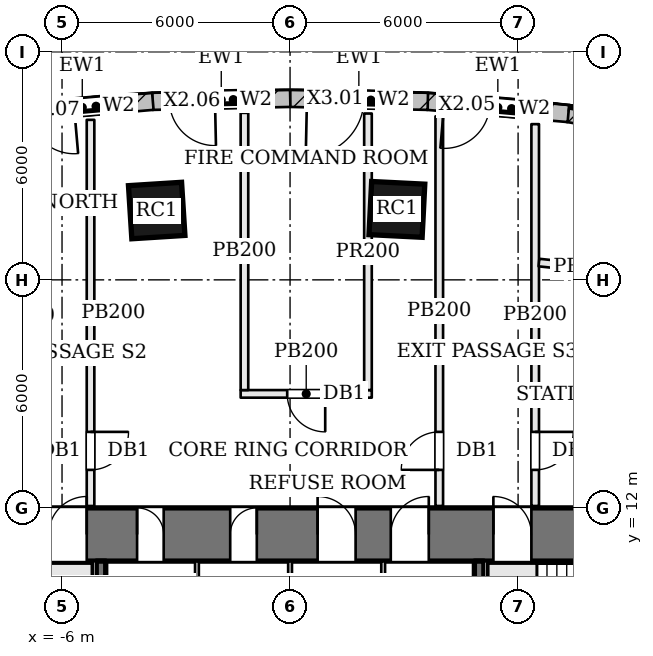
"""IFC4 building model, lengths in metres.
Left out: names, types, materials, properties, quantities, classifications, styles, units other than length and angle.
Written with IfcOpenShell. Run it as: python <this file> out.ifc"""

import sys

from ifc_helpers import new_model, si_unit, direction, frame, frame_2d, origin, origin_2d, place, context, subcontext, project, spatial, rectangle, extrude, element, fill, save


model = new_model("IFC4")
c1 = context("Model", 3, precision=1e-05, world=origin(), true_north=direction((0.0, 1.0)))
c2 = subcontext(c1, "Body", "Model", "MODEL_VIEW")
j1 = project(units=[si_unit("LENGTHUNIT", "METRE"), si_unit("PLANEANGLEUNIT", "RADIAN")], contexts=[c1])
p1 = place(None, origin())
s1 = spatial("IfcSite", under=j1, at=p1, CompositionType="ELEMENT")
p2 = place(p1, origin())
s2 = spatial("IfcBuilding", under=s1, at=p2, CompositionType="ELEMENT")
p3 = place(p2, origin())
s3 = spatial("IfcBuildingStorey", under=s2, at=p3, CompositionType="ELEMENT", Elevation=0.0)
p4 = place(p3, frame((-13.0, 11.3, 0.0), z_axis=(0.0, 0.0, 1.0), x_axis=(1.0, 0.0, 0.0)))
e1 = element("IfcWall", 1, at=p4, inside=s3, PredefinedType="SHEAR", context=c2, shape_type="SweptSolid", body=[
    extrude(rectangle(XDim=26.0, YDim=1.4, at=frame_2d((13.0, 0.0))), origin(), (0.0, 0.0, 1.0), 7.2),
])
p5 = place(p4, frame((8.975, 0.0, 0.0)))
e2 = element("IfcOpeningElement", 2, at=p5, cuts=e1, PredefinedType="OPENING", context=c2, shape_type="SweptSolid", body=[
    extrude(rectangle(XDim=0.7, YDim=2.1, at=frame_2d((0.35, 1.05))), frame((0.0, 0.71, 0.0), z_axis=(0.0, -1.0, 0.0), x_axis=(1.0, 0.0, 0.0)), (0.0, 0.0, 1.0), 1.42),
])
p6 = place(p4, frame((11.425, 0.0, 0.0)))
e3 = element("IfcOpeningElement", 3, at=p6, cuts=e1, PredefinedType="OPENING", context=c2, shape_type="SweptSolid", body=[
    extrude(rectangle(XDim=0.7, YDim=2.1, at=frame_2d((0.35, 1.05))), frame((0.0, 0.71, 0.0), z_axis=(0.0, -1.0, 0.0), x_axis=(1.0, 0.0, 0.0)), (0.0, 0.0, 1.0), 1.42),
])
p7 = place(p4, frame((13.725, 0.0, 0.0)))
e4 = element("IfcOpeningElement", 4, at=p7, cuts=e1, PredefinedType="OPENING", context=c2, shape_type="SweptSolid", body=[
    extrude(rectangle(XDim=1.0, YDim=2.1, at=frame_2d((0.5, 1.05))), frame((0.0, 0.71, 0.0), z_axis=(0.0, -1.0, 0.0), x_axis=(1.0, 0.0, 0.0)), (0.0, 0.0, 1.0), 1.42),
])
p8 = place(p4, frame((15.65, 0.0, 0.0)))
e5 = element("IfcOpeningElement", 5, at=p8, cuts=e1, PredefinedType="OPENING", context=c2, shape_type="SweptSolid", body=[
    extrude(rectangle(XDim=1.0, YDim=2.1, at=frame_2d((0.5, 1.05))), frame((0.0, 0.71, 0.0), z_axis=(0.0, -1.0, 0.0), x_axis=(1.0, 0.0, 0.0)), (0.0, 0.0, 1.0), 1.42),
])
p9 = place(p4, frame((6.65, 0.0, 0.0)))
e6 = element("IfcOpeningElement", 6, at=p9, cuts=e1, PredefinedType="OPENING", context=c2, shape_type="SweptSolid", body=[
    extrude(rectangle(XDim=1.0, YDim=2.1, at=frame_2d((0.5, 1.05))), frame((0.0, 0.71, 0.0), z_axis=(0.0, -1.0, 0.0), x_axis=(1.0, 0.0, 0.0)), (0.0, 0.0, 1.0), 1.42),
])
p10 = place(p4, frame((18.35, 0.0, 0.0)))
e7 = element("IfcOpeningElement", 7, at=p10, cuts=e1, PredefinedType="OPENING", context=c2, shape_type="SweptSolid", body=[
    extrude(rectangle(XDim=1.0, YDim=2.1, at=frame_2d((0.5, 1.05))), frame((0.0, 0.71, 0.0), z_axis=(0.0, -1.0, 0.0), x_axis=(1.0, 0.0, 0.0)), (0.0, 0.0, 1.0), 1.42),
])
for number, where, z_axis, x_axis in (
    (8, (2.811, 19.854, 0.0), (0.0, 0.0, 1.0), (-0.999, 0.05, 0.0)),
    (9, (-3.509, 19.824, 0.0), (0.0, 0.0, 1.0), (-0.998, -0.063, 0.0)),
):
    element("IfcColumn", number, at=place(p3, frame(where, z_axis=z_axis, x_axis=x_axis)), inside=s3, PredefinedType="COLUMN", context=c2, shape_type="SweptSolid", body=[
        extrude(rectangle(XDim=1.4, YDim=1.4, at=origin_2d()), origin(), (0.0, 0.0, 1.0), 7.2),
    ])
p11 = place(p3, frame((11.134, 21.706, 0.0), z_axis=(0.0, 0.0, 1.0), x_axis=(-0.984947461591, 0.172853978566, 0.0)))
e10 = element("IfcWall", 10, at=p11, inside=s3, PredefinedType="SOLIDWALL", context=c2, shape_type="SweptSolid", body=[
    extrude(rectangle(XDim=3.888, YDim=0.45, at=frame_2d((1.944, 0.0))), origin(), (0.0, 0.0, 1.0), 3.55),
])
p12 = place(p11, frame((0.744, 0.0, 0.0)))
e11 = element("IfcOpeningElement", 11, at=p12, cuts=e10, PredefinedType="OPENING", context=c2, shape_type="SweptSolid", body=[
    extrude(rectangle(XDim=2.4, YDim=3.2, at=frame_2d((1.2, 1.6))), frame((0.0, 0.235, 0.0), z_axis=(0.0, -1.0, 0.0), x_axis=(1.0, 0.0, 0.0)), (0.0, 0.0, 1.0), 0.47),
])
p13 = place(p3, frame((7.323, 22.376, 0.0), z_axis=(0.0, 0.0, 1.0), x_axis=(-0.996259982326, 0.086406293838, 0.0)))
e12 = element("IfcWall", 12, at=p13, inside=s3, PredefinedType="SOLIDWALL", context=c2, shape_type="SweptSolid", body=[
    extrude(rectangle(XDim=3.727, YDim=0.45, at=frame_2d((1.863, 0.0))), origin(), (0.0, 0.0, 1.0), 6.95),
])
p14 = place(p13, frame((0.45, 0.0, 0.9)))
e13 = element("IfcOpeningElement", 13, at=p14, cuts=e12, PredefinedType="OPENING", context=c2, shape_type="SweptSolid", body=[
    extrude(rectangle(XDim=2.1, YDim=5.0, at=frame_2d((1.05, 2.5))), frame((0.0, 0.235, 0.0), z_axis=(0.0, -1.0, 0.0), x_axis=(1.0, 0.0, 0.0)), (0.0, 0.0, 1.0), 0.47),
])
p15 = place(p13, frame((2.077, 0.0, 0.0)))
e14 = element("IfcOpeningElement", 14, at=p15, cuts=e12, PredefinedType="OPENING", context=c2, shape_type="SweptSolid", body=[
    extrude(rectangle(XDim=1.2, YDim=2.4, at=frame_2d((0.6, 1.2))), frame((0.0, 0.235, 0.0), z_axis=(0.0, -1.0, 0.0), x_axis=(1.0, 0.0, 0.0)), (0.0, 0.0, 1.0), 0.47),
])
p16 = place(p3, frame((3.625, 22.697, 0.0), z_axis=(0.0, 0.0, 1.0), x_axis=(-0.999769941673, 0.0214490962, 0.0)))
e15 = element("IfcWall", 15, at=p16, inside=s3, PredefinedType="SOLIDWALL", context=c2, shape_type="SweptSolid", body=[
    extrude(rectangle(XDim=3.631, YDim=0.45, at=frame_2d((1.815, 0.0))), origin(), (0.0, 0.0, 1.0), 6.95),
])
p17 = place(p16, frame((0.45, 0.0, 0.9)))
e16 = element("IfcOpeningElement", 16, at=p17, cuts=e15, PredefinedType="OPENING", context=c2, shape_type="SweptSolid", body=[
    extrude(rectangle(XDim=2.1, YDim=5.0, at=frame_2d((1.05, 2.5))), frame((0.0, 0.235, 0.0), z_axis=(0.0, -1.0, 0.0), x_axis=(1.0, 0.0, 0.0)), (0.0, 0.0, 1.0), 0.47),
])
p18 = place(p16, frame((1.681, 0.0, 0.0)))
e17 = element("IfcOpeningElement", 17, at=p18, cuts=e15, PredefinedType="OPENING", context=c2, shape_type="SweptSolid", body=[
    extrude(rectangle(XDim=1.5, YDim=2.4, at=frame_2d((0.75, 1.2))), frame((0.0, 0.235, 0.0), z_axis=(0.0, -1.0, 0.0), x_axis=(1.0, 0.0, 0.0)), (0.0, 0.0, 1.0), 0.47),
])
p19 = place(p3, frame((0.005, 22.775, 0.0), z_axis=(0.0, 0.0, 1.0), x_axis=(-0.999769941673, -0.0214490962, 0.0)))
e18 = element("IfcWall", 18, at=p19, inside=s3, PredefinedType="SOLIDWALL", context=c2, shape_type="SweptSolid", body=[
    extrude(rectangle(XDim=3.631, YDim=0.45, at=frame_2d((1.815, 0.0))), origin(), (0.0, 0.0, 1.0), 6.95),
])
p20 = place(p19, frame((0.45, 0.0, 0.9)))
e19 = element("IfcOpeningElement", 19, at=p20, cuts=e18, PredefinedType="OPENING", context=c2, shape_type="SweptSolid", body=[
    extrude(rectangle(XDim=2.1, YDim=5.0, at=frame_2d((1.05, 2.5))), frame((0.0, 0.235, 0.0), z_axis=(0.0, -1.0, 0.0), x_axis=(1.0, 0.0, 0.0)), (0.0, 0.0, 1.0), 0.47),
])
p21 = place(p19, frame((1.981, 0.0, 0.0)))
e20 = element("IfcOpeningElement", 20, at=p21, cuts=e18, PredefinedType="OPENING", context=c2, shape_type="SweptSolid", body=[
    extrude(rectangle(XDim=1.2, YDim=2.4, at=frame_2d((0.6, 1.2))), frame((0.0, 0.235, 0.0), z_axis=(0.0, -1.0, 0.0), x_axis=(1.0, 0.0, 0.0)), (0.0, 0.0, 1.0), 0.47),
])
p22 = place(p3, frame((-3.611, 22.698, 0.0), z_axis=(0.0, 0.0, 1.0), x_axis=(-0.996259982326, -0.086406293838, 0.0)))
e21 = element("IfcWall", 21, at=p22, inside=s3, PredefinedType="SOLIDWALL", context=c2, shape_type="SweptSolid", body=[
    extrude(rectangle(XDim=3.727, YDim=0.45, at=frame_2d((1.863, 0.0))), origin(), (0.0, 0.0, 1.0), 6.95),
])
p23 = place(p22, frame((0.45, 0.0, 0.9)))
e22 = element("IfcOpeningElement", 22, at=p23, cuts=e21, PredefinedType="OPENING", context=c2, shape_type="SweptSolid", body=[
    extrude(rectangle(XDim=2.1, YDim=5.0, at=frame_2d((1.05, 2.5))), frame((0.0, 0.235, 0.0), z_axis=(0.0, -1.0, 0.0), x_axis=(1.0, 0.0, 0.0)), (0.0, 0.0, 1.0), 0.47),
])
p24 = place(p22, frame((2.077, 0.0, 0.0)))
e23 = element("IfcOpeningElement", 23, at=p24, cuts=e21, PredefinedType="OPENING", context=c2, shape_type="SweptSolid", body=[
    extrude(rectangle(XDim=1.2, YDim=2.4, at=frame_2d((0.6, 1.2))), frame((0.0, 0.235, 0.0), z_axis=(0.0, -1.0, 0.0), x_axis=(1.0, 0.0, 0.0)), (0.0, 0.0, 1.0), 0.47),
])
p25 = place(p3, frame((-4.975, -1.6, 0.0), z_axis=(0.0, 0.0, 1.0), x_axis=(0.0, 1.0, 0.0)))
e24 = element("IfcWall", 24, at=p25, inside=s3, PredefinedType="SOLIDWALL", context=c2, shape_type="SweptSolid", body=[
    extrude(rectangle(XDim=12.2, YDim=0.25, at=frame_2d((6.1, 0.0))), origin(), (0.0, 0.0, 1.0), 6.95),
])
p26 = place(p25, frame((4.65, 0.0, 0.0)))
e25 = element("IfcOpeningElement", 25, at=p26, cuts=e24, PredefinedType="OPENING", context=c2, shape_type="SweptSolid", body=[
    extrude(rectangle(XDim=1.2, YDim=2.1, at=frame_2d((0.6, 1.05))), frame((0.0, 0.135, 0.0), z_axis=(0.0, -1.0, 0.0), x_axis=(1.0, 0.0, 0.0)), (0.0, 0.0, 1.0), 0.27),
])
p27 = place(p3, frame((4.975, 10.6, 0.0), z_axis=(0.0, 0.0, 1.0), x_axis=(0.0, -1.0, 0.0)))
e26 = element("IfcWall", 26, at=p27, inside=s3, PredefinedType="SOLIDWALL", context=c2, shape_type="SweptSolid", body=[
    extrude(rectangle(XDim=12.2, YDim=0.25, at=frame_2d((6.1, 0.0))), origin(), (0.0, 0.0, 1.0), 6.95),
])
p28 = place(p27, frame((4.65, 0.0, 0.0)))
e27 = element("IfcOpeningElement", 27, at=p28, cuts=e26, PredefinedType="OPENING", context=c2, shape_type="SweptSolid", body=[
    extrude(rectangle(XDim=1.2, YDim=2.1, at=frame_2d((0.6, 1.05))), frame((0.0, 0.135, 0.0), z_axis=(0.0, -1.0, 0.0), x_axis=(1.0, 0.0, 0.0)), (0.0, 0.0, 1.0), 0.27),
])
for number, where, z_axis, x_axis in (
    (28, (-2.45, 8.6, 0.0), (0.0, 0.0, 1.0), (0.0, 1.0, 0.0)),
    (29, (0.0, 8.6, 0.0), (0.0, 0.0, 1.0), (0.0, 1.0, 0.0)),
    (30, (2.45, 8.6, 0.0), (0.0, 0.0, 1.0), (0.0, 1.0, 0.0)),
):
    element("IfcWall", number, at=place(p3, frame(where, z_axis=z_axis, x_axis=x_axis)), inside=s3, PredefinedType="PARTITIONING", context=c2, shape_type="SweptSolid", body=[
        extrude(rectangle(XDim=2.0, YDim=0.1, at=frame_2d((1.0, 0.0))), origin(), (0.0, 0.0, 1.0), 6.95),
    ])
p29 = place(p3, frame((-5.25, 22.21, 0.0), z_axis=(0.0, 0.0, 1.0), x_axis=(0.0, -1.0, 0.0)))
e31 = element("IfcWall", 31, at=p29, inside=s3, PredefinedType="PARTITIONING", context=c2, shape_type="SweptSolid", body=[
    extrude(rectangle(XDim=10.16, YDim=0.2, at=frame_2d((5.08, 0.0))), origin(), (0.0, 0.0, 1.0), 6.23),
])
p30 = place(p29, frame((8.21, 0.0, 0.0)))
e32 = element("IfcOpeningElement", 32, at=p30, cuts=e31, PredefinedType="OPENING", context=c2, shape_type="SweptSolid", body=[
    extrude(rectangle(XDim=1.0, YDim=2.1, at=frame_2d((0.5, 1.05))), frame((0.0, 0.11, 0.0), z_axis=(0.0, -1.0, 0.0), x_axis=(1.0, 0.0, 0.0)), (0.0, 0.0, 1.0), 0.22),
])
p31 = place(p3, frame((3.926, 12.05, 0.0), z_axis=(0.0, 0.0, 1.0), x_axis=(0.0, 1.0, 0.0)))
e33 = element("IfcWall", 33, at=p31, inside=s3, PredefinedType="PARTITIONING", context=c2, shape_type="SweptSolid", body=[
    extrude(rectangle(XDim=10.252, YDim=0.2, at=frame_2d((5.126, 0.0))), origin(), (0.0, 0.0, 1.0), 6.23),
])
p32 = place(p31, frame((0.95, 0.0, 0.0)))
e34 = element("IfcOpeningElement", 34, at=p32, cuts=e33, PredefinedType="OPENING", context=c2, shape_type="SweptSolid", body=[
    extrude(rectangle(XDim=1.0, YDim=2.1, at=frame_2d((0.5, 1.05))), frame((0.0, 0.11, 0.0), z_axis=(0.0, -1.0, 0.0), x_axis=(1.0, 0.0, 0.0)), (0.0, 0.0, 1.0), 0.22),
])
p33 = place(p3, frame((6.45, 22.097, 0.0), z_axis=(0.0, 0.0, 1.0), x_axis=(0.0, -1.0, 0.0)))
e35 = element("IfcWall", 35, at=p33, inside=s3, PredefinedType="PARTITIONING", context=c2, shape_type="SweptSolid", body=[
    extrude(rectangle(XDim=10.047, YDim=0.2, at=frame_2d((5.023, 0.0))), origin(), (0.0, 0.0, 1.0), 6.23),
])
p34 = place(p33, frame((8.097, 0.0, 0.0)))
e36 = element("IfcOpeningElement", 36, at=p34, cuts=e35, PredefinedType="OPENING", context=c2, shape_type="SweptSolid", body=[
    extrude(rectangle(XDim=1.0, YDim=2.1, at=frame_2d((0.5, 1.05))), frame((0.0, 0.11, 0.0), z_axis=(0.0, -1.0, 0.0), x_axis=(1.0, 0.0, 0.0)), (0.0, 0.0, 1.0), 0.22),
])
p35 = place(p3, frame((2.15, 15.0, 0.0), z_axis=(0.0, 0.0, 1.0), x_axis=(-1.0, 0.0, 0.0)))
e37 = element("IfcWall", 37, at=p35, inside=s3, PredefinedType="PARTITIONING", context=c2, shape_type="SweptSolid", body=[
    extrude(rectangle(XDim=3.45, YDim=0.2, at=frame_2d((1.725, 0.0))), origin(), (0.0, 0.0, 1.0), 6.23),
])
p36 = place(p35, frame((1.225, 0.0, 0.0)))
e38 = element("IfcOpeningElement", 38, at=p36, cuts=e37, PredefinedType="OPENING", context=c2, shape_type="SweptSolid", body=[
    extrude(rectangle(XDim=1.0, YDim=2.1, at=frame_2d((0.5, 1.05))), frame((0.0, 0.11, 0.0), z_axis=(0.0, -1.0, 0.0), x_axis=(1.0, 0.0, 0.0)), (0.0, 0.0, 1.0), 0.22),
])
p37 = place(p3, frame((-1.2, 15.1, 0.0), z_axis=(0.0, 0.0, 1.0), x_axis=(0.0, 1.0, 0.0)))
e39 = element("IfcWall", 39, at=p37, inside=s3, PredefinedType="PARTITIONING", context=c2, shape_type="SweptSolid", body=[
    extrude(rectangle(XDim=7.294, YDim=0.2, at=frame_2d((3.647, 0.0))), origin(), (0.0, 0.0, 1.0), 6.23),
])
p38 = place(p3, frame((2.05, 22.377, 0.0), z_axis=(0.0, 0.0, 1.0), x_axis=(0.0, -1.0, 0.0)))
e40 = element("IfcWall", 40, at=p38, inside=s3, PredefinedType="PARTITIONING", context=c2, shape_type="SweptSolid", body=[
    extrude(rectangle(XDim=7.277, YDim=0.2, at=frame_2d((3.638, 0.0))), origin(), (0.0, 0.0, 1.0), 6.58),
])
p39 = place(p3, frame((16.1, 15.0, 0.0), z_axis=(0.0, 0.0, 1.0), x_axis=(-1.0, 0.0, 0.0)))
e41 = element("IfcWall", 41, at=p39, inside=s3, PredefinedType="PARTITIONING", context=c2, shape_type="SweptSolid", body=[
    extrude(rectangle(XDim=9.55, YDim=0.2, at=frame_2d((4.775, 0.0))), origin(), (0.0, 0.0, 1.0), 6.23),
])
p40 = place(p39, frame((4.375, 0.0, 0.0)))
e42 = element("IfcOpeningElement", 42, at=p40, cuts=e41, PredefinedType="OPENING", context=c2, shape_type="SweptSolid", body=[
    extrude(rectangle(XDim=1.0, YDim=2.1, at=frame_2d((0.5, 1.05))), frame((0.0, 0.11, 0.0), z_axis=(0.0, -1.0, 0.0), x_axis=(1.0, 0.0, 0.0)), (0.0, 0.0, 1.0), 0.22),
])
p41 = place(p3, frame((6.549, 18.455, 0.0), z_axis=(0.0, 0.0, 1.0), x_axis=(0.994502738507, -0.104710568244, 0.0)))
e43 = element("IfcWall", 43, at=p41, inside=s3, PredefinedType="PARTITIONING", context=c2, shape_type="SweptSolid", body=[
    extrude(rectangle(XDim=2.464, YDim=0.2, at=frame_2d((1.232, 0.0))), origin(), (0.0, 0.0, 1.0), 6.58),
])
p42 = place(p14, origin())
e44 = element("IfcWindow", 44, at=p42, inside=s3, PartitioningType="SINGLE_PANEL", PredefinedType="WINDOW", context=c2, shape_type="SweptSolid", body=[
    extrude(rectangle(XDim=2.1, YDim=5.0, at=frame_2d((1.05, 2.5))), frame((0.0, 0.135, 0.0), z_axis=(0.0, -1.0, 0.0), x_axis=(1.0, 0.0, 0.0)), (0.0, 0.0, 1.0), 0.06),
])
fill(e13, e44)
p43 = place(p15, frame((1.2, 0.0, 0.0), z_axis=(0.0, 0.0, 1.0), x_axis=(-1.0, 0.0, 0.0)))
e45 = element("IfcDoor", 45, at=p43, inside=s3, OperationType="SINGLE_SWING_RIGHT", PredefinedType="DOOR", context=c2, shape_type="SweptSolid", body=[
    extrude(rectangle(XDim=1.2, YDim=2.4, at=frame_2d((0.6, 1.2))), frame((0.0, 0.025, 0.0), z_axis=(0.0, -1.0, 0.0), x_axis=(1.0, 0.0, 0.0)), (0.0, 0.0, 1.0), 0.05),
])
fill(e14, e45)
p44 = place(p17, origin())
e46 = element("IfcWindow", 46, at=p44, inside=s3, PartitioningType="SINGLE_PANEL", PredefinedType="WINDOW", context=c2, shape_type="SweptSolid", body=[
    extrude(rectangle(XDim=2.1, YDim=5.0, at=frame_2d((1.05, 2.5))), frame((0.0, 0.135, 0.0), z_axis=(0.0, -1.0, 0.0), x_axis=(1.0, 0.0, 0.0)), (0.0, 0.0, 1.0), 0.06),
])
fill(e16, e46)
p45 = place(p18, frame((1.5, 0.0, 0.0), z_axis=(0.0, 0.0, 1.0), x_axis=(-1.0, 0.0, 0.0)))
e47 = element("IfcDoor", 47, at=p45, inside=s3, OperationType="SINGLE_SWING_RIGHT", PredefinedType="DOOR", context=c2, shape_type="SweptSolid", body=[
    extrude(rectangle(XDim=1.5, YDim=2.4, at=frame_2d((0.75, 1.2))), frame((0.0, 0.025, 0.0), z_axis=(0.0, -1.0, 0.0), x_axis=(1.0, 0.0, 0.0)), (0.0, 0.0, 1.0), 0.05),
])
fill(e17, e47)
p46 = place(p20, origin())
e48 = element("IfcWindow", 48, at=p46, inside=s3, PartitioningType="SINGLE_PANEL", PredefinedType="WINDOW", context=c2, shape_type="SweptSolid", body=[
    extrude(rectangle(XDim=2.1, YDim=5.0, at=frame_2d((1.05, 2.5))), frame((0.0, 0.135, 0.0), z_axis=(0.0, -1.0, 0.0), x_axis=(1.0, 0.0, 0.0)), (0.0, 0.0, 1.0), 0.06),
])
fill(e19, e48)
p47 = place(p21, frame((1.2, 0.0, 0.0), z_axis=(0.0, 0.0, 1.0), x_axis=(-1.0, 0.0, 0.0)))
e49 = element("IfcDoor", 49, at=p47, inside=s3, OperationType="SINGLE_SWING_LEFT", PredefinedType="DOOR", context=c2, shape_type="SweptSolid", body=[
    extrude(rectangle(XDim=1.2, YDim=2.4, at=frame_2d((0.6, 1.2))), frame((0.0, 0.025, 0.0), z_axis=(0.0, -1.0, 0.0), x_axis=(1.0, 0.0, 0.0)), (0.0, 0.0, 1.0), 0.05),
])
fill(e20, e49)
p48 = place(p23, origin())
e50 = element("IfcWindow", 50, at=p48, inside=s3, PartitioningType="SINGLE_PANEL", PredefinedType="WINDOW", context=c2, shape_type="SweptSolid", body=[
    extrude(rectangle(XDim=2.1, YDim=5.0, at=frame_2d((1.05, 2.5))), frame((0.0, 0.135, 0.0), z_axis=(0.0, -1.0, 0.0), x_axis=(1.0, 0.0, 0.0)), (0.0, 0.0, 1.0), 0.06),
])
fill(e22, e50)
p49 = place(p24, frame((1.2, 0.0, 0.0), z_axis=(0.0, 0.0, 1.0), x_axis=(-1.0, 0.0, 0.0)))
e51 = element("IfcDoor", 51, at=p49, inside=s3, OperationType="SINGLE_SWING_LEFT", PredefinedType="DOOR", context=c2, shape_type="SweptSolid", body=[
    extrude(rectangle(XDim=1.2, YDim=2.4, at=frame_2d((0.6, 1.2))), frame((0.0, 0.025, 0.0), z_axis=(0.0, -1.0, 0.0), x_axis=(1.0, 0.0, 0.0)), (0.0, 0.0, 1.0), 0.05),
])
fill(e23, e51)
p50 = place(p5, origin())
e52 = element("IfcDoor", 52, at=p50, inside=s3, OperationType="SINGLE_SWING_LEFT", PredefinedType="DOOR", context=c2, shape_type="SweptSolid", body=[
    extrude(rectangle(XDim=0.7, YDim=2.1, at=frame_2d((0.35, 1.05))), frame((0.0, 0.025, 0.0), z_axis=(0.0, -1.0, 0.0), x_axis=(1.0, 0.0, 0.0)), (0.0, 0.0, 1.0), 0.05),
])
fill(e2, e52)
p51 = place(p6, origin())
e53 = element("IfcDoor", 53, at=p51, inside=s3, OperationType="SINGLE_SWING_RIGHT", PredefinedType="DOOR", context=c2, shape_type="SweptSolid", body=[
    extrude(rectangle(XDim=0.7, YDim=2.1, at=frame_2d((0.35, 1.05))), frame((0.0, 0.025, 0.0), z_axis=(0.0, -1.0, 0.0), x_axis=(1.0, 0.0, 0.0)), (0.0, 0.0, 1.0), 0.05),
])
fill(e3, e53)
p52 = place(p7, origin())
e54 = element("IfcDoor", 54, at=p52, inside=s3, OperationType="SINGLE_SWING_LEFT", PredefinedType="DOOR", context=c2, shape_type="SweptSolid", body=[
    extrude(rectangle(XDim=1.0, YDim=2.1, at=frame_2d((0.5, 1.05))), frame((0.0, 0.025, 0.0), z_axis=(0.0, -1.0, 0.0), x_axis=(1.0, 0.0, 0.0)), (0.0, 0.0, 1.0), 0.05),
])
fill(e4, e54)
p53 = place(p8, origin())
e55 = element("IfcDoor", 55, at=p53, inside=s3, OperationType="SINGLE_SWING_RIGHT", PredefinedType="DOOR", context=c2, shape_type="SweptSolid", body=[
    extrude(rectangle(XDim=1.0, YDim=2.1, at=frame_2d((0.5, 1.05))), frame((0.0, 0.025, 0.0), z_axis=(0.0, -1.0, 0.0), x_axis=(1.0, 0.0, 0.0)), (0.0, 0.0, 1.0), 0.05),
])
fill(e5, e55)
p54 = place(p9, origin())
e56 = element("IfcDoor", 56, at=p54, inside=s3, OperationType="SINGLE_SWING_RIGHT", PredefinedType="DOOR", context=c2, shape_type="SweptSolid", body=[
    extrude(rectangle(XDim=1.0, YDim=2.1, at=frame_2d((0.5, 1.05))), frame((0.0, 0.025, 0.0), z_axis=(0.0, -1.0, 0.0), x_axis=(1.0, 0.0, 0.0)), (0.0, 0.0, 1.0), 0.05),
])
fill(e6, e56)
p55 = place(p10, origin())
e57 = element("IfcDoor", 57, at=p55, inside=s3, OperationType="SINGLE_SWING_LEFT", PredefinedType="DOOR", context=c2, shape_type="SweptSolid", body=[
    extrude(rectangle(XDim=1.0, YDim=2.1, at=frame_2d((0.5, 1.05))), frame((0.0, 0.025, 0.0), z_axis=(0.0, -1.0, 0.0), x_axis=(1.0, 0.0, 0.0)), (0.0, 0.0, 1.0), 0.05),
])
fill(e7, e57)
p56 = place(p30, origin())
e58 = element("IfcDoor", 58, at=p56, inside=s3, OperationType="SINGLE_SWING_LEFT", PredefinedType="DOOR", context=c2, shape_type="SweptSolid", body=[
    extrude(rectangle(XDim=1.0, YDim=2.1, at=frame_2d((0.5, 1.05))), frame((0.0, 0.025, 0.0), z_axis=(0.0, -1.0, 0.0), x_axis=(1.0, 0.0, 0.0)), (0.0, 0.0, 1.0), 0.05),
])
fill(e32, e58)
p57 = place(p34, origin())
e59 = element("IfcDoor", 59, at=p57, inside=s3, OperationType="SINGLE_SWING_LEFT", PredefinedType="DOOR", context=c2, shape_type="SweptSolid", body=[
    extrude(rectangle(XDim=1.0, YDim=2.1, at=frame_2d((0.5, 1.05))), frame((0.0, 0.025, 0.0), z_axis=(0.0, -1.0, 0.0), x_axis=(1.0, 0.0, 0.0)), (0.0, 0.0, 1.0), 0.05),
])
fill(e36, e59)
p58 = place(p32, origin())
e60 = element("IfcDoor", 60, at=p58, inside=s3, OperationType="SINGLE_SWING_LEFT", PredefinedType="DOOR", context=c2, shape_type="SweptSolid", body=[
    extrude(rectangle(XDim=1.0, YDim=2.1, at=frame_2d((0.5, 1.05))), frame((0.0, 0.025, 0.0), z_axis=(0.0, -1.0, 0.0), x_axis=(1.0, 0.0, 0.0)), (0.0, 0.0, 1.0), 0.05),
])
fill(e34, e60)
p59 = place(p36, origin())
e61 = element("IfcDoor", 61, at=p59, inside=s3, OperationType="SINGLE_SWING_LEFT", PredefinedType="DOOR", context=c2, shape_type="SweptSolid", body=[
    extrude(rectangle(XDim=1.0, YDim=2.1, at=frame_2d((0.5, 1.05))), frame((0.0, 0.025, 0.0), z_axis=(0.0, -1.0, 0.0), x_axis=(1.0, 0.0, 0.0)), (0.0, 0.0, 1.0), 0.05),
])
fill(e38, e61)
save(model, sys.argv[1])
